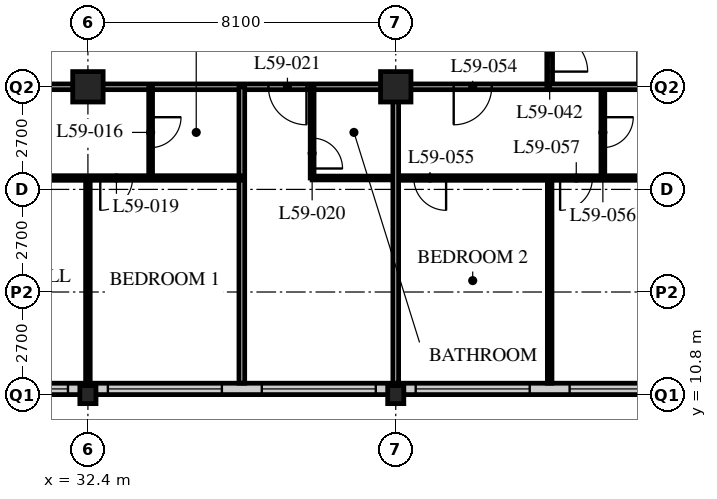
"""IFC4 building model, lengths in metres.
Left out: names, types, materials, properties, quantities, classifications, styles, units other than length and angle.
Written with IfcOpenShell. Run it as: python <this file> out.ifc"""

import sys

from ifc_helpers import new_model, si_unit, direction, frame, frame_2d, origin, origin_2d, place, context, subcontext, project, spatial, rectangle, hollow_rectangle, i_section, extrude, element, fill, save


model = new_model("IFC4")
c1 = context("Model", 3, precision=1e-05, world=origin(), true_north=direction((0.0, 1.0)))
c2 = subcontext(c1, "Body", "Model", "MODEL_VIEW")
j1 = project(units=[si_unit("LENGTHUNIT", "METRE"), si_unit("PLANEANGLEUNIT", "RADIAN")], contexts=[c1])
p1 = place(None, origin())
s1 = spatial("IfcSite", under=j1, at=p1, CompositionType="ELEMENT")
p2 = place(p1, origin())
s2 = spatial("IfcBuilding", under=s1, at=p2, CompositionType="ELEMENT")
p3 = place(p2, frame((0.0, 0.0, 228.0)))
s3 = spatial("IfcBuildingStorey", under=s2, at=p3, CompositionType="ELEMENT", Elevation=228.0)
p4 = place(p3, frame((32.4, 10.8, 0.0), z_axis=(0.0, 0.0, 1.0), x_axis=(1.0, 0.0, 0.0)))
e1 = element("IfcColumn", 1, at=p4, inside=s3, PredefinedType="COLUMN", context=c2, shape_type="SweptSolid", body=[
    extrude(i_section(OverallWidth=0.424, OverallDepth=0.475, WebThickness=0.048, FlangeThickness=0.077, FilletRadius=0.015, at=origin_2d()), origin(), (0.0, 0.0, 1.0), 3.6),
])
p5 = place(p3, frame((32.4, 18.9, 0.0), z_axis=(0.0, 0.0, 1.0), x_axis=(1.0, 0.0, 0.0)))
e2 = element("IfcColumn", 2, at=p5, inside=s3, PredefinedType="COLUMN", context=c2, shape_type="SweptSolid", body=[
    extrude(hollow_rectangle(XDim=0.8, YDim=0.8, WallThickness=0.08, at=origin_2d()), origin(), (0.0, 0.0, 1.0), 3.6),
])
p6 = place(p3, frame((40.5, 10.8, 0.0), z_axis=(0.0, 0.0, 1.0), x_axis=(1.0, 0.0, 0.0)))
e3 = element("IfcColumn", 3, at=p6, inside=s3, PredefinedType="COLUMN", context=c2, shape_type="SweptSolid", body=[
    extrude(i_section(OverallWidth=0.424, OverallDepth=0.475, WebThickness=0.048, FlangeThickness=0.077, FilletRadius=0.015, at=origin_2d()), origin(), (0.0, 0.0, 1.0), 3.6),
])
p7 = place(p3, frame((40.5, 18.9, 0.0), z_axis=(0.0, 0.0, 1.0), x_axis=(1.0, 0.0, 0.0)))
e4 = element("IfcColumn", 4, at=p7, inside=s3, PredefinedType="COLUMN", context=c2, shape_type="SweptSolid", body=[
    extrude(hollow_rectangle(XDim=0.8, YDim=0.8, WallThickness=0.08, at=origin_2d()), origin(), (0.0, 0.0, 1.0), 3.6),
])
p8 = place(p3, frame((8.4, 10.95, 0.0), z_axis=(0.0, 0.0, 1.0), x_axis=(1.0, 0.0, 0.0)))
e5 = element("IfcWall", 5, at=p8, inside=s3, PredefinedType="SOLIDWALL", context=c2, shape_type="SweptSolid", body=[
    extrude(rectangle(XDim=40.2, YDim=0.3, at=frame_2d((20.1, 0.0))), origin(), (0.0, 0.0, 1.0), 3.39),
])
p9 = place(p8, frame((0.225, 0.0, 0.6)))
e6 = element("IfcOpeningElement", 6, at=p9, cuts=e5, PredefinedType="OPENING", context=c2, shape_type="SweptSolid", body=[
    extrude(rectangle(XDim=3.0, YDim=2.0, at=frame_2d((1.5, 1.0))), frame((0.0, 0.16, 0.0), z_axis=(0.0, -1.0, 0.0), x_axis=(1.0, 0.0, 0.0)), (0.0, 0.0, 1.0), 0.32),
])
p10 = place(p8, frame((4.275, 0.0, 0.6)))
e7 = element("IfcOpeningElement", 7, at=p10, cuts=e5, PredefinedType="OPENING", context=c2, shape_type="SweptSolid", body=[
    extrude(rectangle(XDim=3.0, YDim=2.0, at=frame_2d((1.5, 1.0))), frame((0.0, 0.16, 0.0), z_axis=(0.0, -1.0, 0.0), x_axis=(1.0, 0.0, 0.0)), (0.0, 0.0, 1.0), 0.32),
])
p11 = place(p8, frame((8.325, 0.0, 0.6)))
e8 = element("IfcOpeningElement", 8, at=p11, cuts=e5, PredefinedType="OPENING", context=c2, shape_type="SweptSolid", body=[
    extrude(rectangle(XDim=3.0, YDim=2.0, at=frame_2d((1.5, 1.0))), frame((0.0, 0.16, 0.0), z_axis=(0.0, -1.0, 0.0), x_axis=(1.0, 0.0, 0.0)), (0.0, 0.0, 1.0), 0.32),
])
p12 = place(p8, frame((12.375, 0.0, 0.6)))
e9 = element("IfcOpeningElement", 9, at=p12, cuts=e5, PredefinedType="OPENING", context=c2, shape_type="SweptSolid", body=[
    extrude(rectangle(XDim=3.0, YDim=2.0, at=frame_2d((1.5, 1.0))), frame((0.0, 0.16, 0.0), z_axis=(0.0, -1.0, 0.0), x_axis=(1.0, 0.0, 0.0)), (0.0, 0.0, 1.0), 0.32),
])
p13 = place(p8, frame((16.425, 0.0, 0.6)))
e10 = element("IfcOpeningElement", 10, at=p13, cuts=e5, PredefinedType="OPENING", context=c2, shape_type="SweptSolid", body=[
    extrude(rectangle(XDim=3.0, YDim=2.0, at=frame_2d((1.5, 1.0))), frame((0.0, 0.16, 0.0), z_axis=(0.0, -1.0, 0.0), x_axis=(1.0, 0.0, 0.0)), (0.0, 0.0, 1.0), 0.32),
])
p14 = place(p8, frame((20.475, 0.0, 0.6)))
e11 = element("IfcOpeningElement", 11, at=p14, cuts=e5, PredefinedType="OPENING", context=c2, shape_type="SweptSolid", body=[
    extrude(rectangle(XDim=3.0, YDim=2.0, at=frame_2d((1.5, 1.0))), frame((0.0, 0.16, 0.0), z_axis=(0.0, -1.0, 0.0), x_axis=(1.0, 0.0, 0.0)), (0.0, 0.0, 1.0), 0.32),
])
p15 = place(p8, frame((24.525, 0.0, 0.6)))
e12 = element("IfcOpeningElement", 12, at=p15, cuts=e5, PredefinedType="OPENING", context=c2, shape_type="SweptSolid", body=[
    extrude(rectangle(XDim=3.0, YDim=2.0, at=frame_2d((1.5, 1.0))), frame((0.0, 0.16, 0.0), z_axis=(0.0, -1.0, 0.0), x_axis=(1.0, 0.0, 0.0)), (0.0, 0.0, 1.0), 0.32),
])
p16 = place(p8, frame((28.575, 0.0, 0.6)))
e13 = element("IfcOpeningElement", 13, at=p16, cuts=e5, PredefinedType="OPENING", context=c2, shape_type="SweptSolid", body=[
    extrude(rectangle(XDim=3.0, YDim=2.0, at=frame_2d((1.5, 1.0))), frame((0.0, 0.16, 0.0), z_axis=(0.0, -1.0, 0.0), x_axis=(1.0, 0.0, 0.0)), (0.0, 0.0, 1.0), 0.32),
])
p17 = place(p8, frame((32.625, 0.0, 0.6)))
e14 = element("IfcOpeningElement", 14, at=p17, cuts=e5, PredefinedType="OPENING", context=c2, shape_type="SweptSolid", body=[
    extrude(rectangle(XDim=3.0, YDim=2.0, at=frame_2d((1.5, 1.0))), frame((0.0, 0.16, 0.0), z_axis=(0.0, -1.0, 0.0), x_axis=(1.0, 0.0, 0.0)), (0.0, 0.0, 1.0), 0.32),
])
p18 = place(p8, frame((36.675, 0.0, 0.6)))
e15 = element("IfcOpeningElement", 15, at=p18, cuts=e5, PredefinedType="OPENING", context=c2, shape_type="SweptSolid", body=[
    extrude(rectangle(XDim=3.0, YDim=2.0, at=frame_2d((1.5, 1.0))), frame((0.0, 0.16, 0.0), z_axis=(0.0, -1.0, 0.0), x_axis=(1.0, 0.0, 0.0)), (0.0, 0.0, 1.0), 0.32),
])
p19 = place(p3, frame((8.1, 18.9, 0.0), z_axis=(0.0, 0.0, 1.0), x_axis=(1.0, 0.0, 0.0)))
e16 = element("IfcWall", 16, at=p19, inside=s3, PredefinedType="PARTITIONING", context=c2, shape_type="SweptSolid", body=[
    extrude(rectangle(XDim=36.45, YDim=0.15, at=frame_2d((18.225, 0.0))), origin(), (0.0, 0.0, 1.0), 2.628),
])
p20 = place(p19, frame((4.45, 0.0, 0.0)))
e17 = element("IfcOpeningElement", 17, at=p20, cuts=e16, PredefinedType="OPENING", context=c2, shape_type="SweptSolid", body=[
    extrude(rectangle(XDim=1.0, YDim=2.1, at=frame_2d((0.5, 1.05))), frame((0.0, 0.085, 0.0), z_axis=(0.0, -1.0, 0.0), x_axis=(1.0, 0.0, 0.0)), (0.0, 0.0, 1.0), 0.17),
])
p21 = place(p19, frame((17.1, 0.0, 0.0)))
e18 = element("IfcOpeningElement", 18, at=p21, cuts=e16, PredefinedType="OPENING", context=c2, shape_type="SweptSolid", body=[
    extrude(rectangle(XDim=1.0, YDim=2.1, at=frame_2d((0.5, 1.05))), frame((0.0, 0.085, 0.0), z_axis=(0.0, -1.0, 0.0), x_axis=(1.0, 0.0, 0.0)), (0.0, 0.0, 1.0), 0.17),
])
p22 = place(p19, frame((29.05, 0.0, 0.0)))
e19 = element("IfcOpeningElement", 19, at=p22, cuts=e16, PredefinedType="OPENING", context=c2, shape_type="SweptSolid", body=[
    extrude(rectangle(XDim=1.0, YDim=2.1, at=frame_2d((0.5, 1.05))), frame((0.0, 0.085, 0.0), z_axis=(0.0, -1.0, 0.0), x_axis=(1.0, 0.0, 0.0)), (0.0, 0.0, 1.0), 0.17),
])
p23 = place(p19, frame((2.625, 0.0, 0.0)))
e20 = element("IfcOpeningElement", 20, at=p23, cuts=e16, PredefinedType="OPENING", context=c2, shape_type="SweptSolid", body=[
    extrude(rectangle(XDim=1.0, YDim=2.1, at=frame_2d((0.5, 1.05))), frame((0.0, 0.085, 0.0), z_axis=(0.0, -1.0, 0.0), x_axis=(1.0, 0.0, 0.0)), (0.0, 0.0, 1.0), 0.17),
])
p24 = place(p19, frame((33.925, 0.0, 0.0)))
e21 = element("IfcOpeningElement", 21, at=p24, cuts=e16, PredefinedType="OPENING", context=c2, shape_type="SweptSolid", body=[
    extrude(rectangle(XDim=1.0, YDim=2.1, at=frame_2d((0.5, 1.05))), frame((0.0, 0.085, 0.0), z_axis=(0.0, -1.0, 0.0), x_axis=(1.0, 0.0, 0.0)), (0.0, 0.0, 1.0), 0.17),
])
p25 = place(p3, frame((44.55, 18.9, 0.0), z_axis=(0.0, 0.0, 1.0), x_axis=(0.0, 1.0, 0.0)))
e22 = element("IfcWall", 22, at=p25, inside=s3, PredefinedType="PARTITIONING", context=c2, shape_type="SweptSolid", body=[
    extrude(rectangle(XDim=24.3, YDim=0.15, at=frame_2d((12.15, 0.0))), origin(), (0.0, 0.0, 1.0), 3.39),
])
p26 = place(p25, frame((0.4, 0.0, 0.0)))
e23 = element("IfcOpeningElement", 23, at=p26, cuts=e22, PredefinedType="OPENING", context=c2, shape_type="SweptSolid", body=[
    extrude(rectangle(XDim=1.0, YDim=2.1, at=frame_2d((0.5, 1.05))), frame((0.0, 0.085, 0.0), z_axis=(0.0, -1.0, 0.0), x_axis=(1.0, 0.0, 0.0)), (0.0, 0.0, 1.0), 0.17),
])
p27 = place(p25, frame((16.6, 0.0, 0.0)))
e24 = element("IfcOpeningElement", 24, at=p27, cuts=e22, PredefinedType="OPENING", context=c2, shape_type="SweptSolid", body=[
    extrude(rectangle(XDim=1.0, YDim=2.1, at=frame_2d((0.5, 1.05))), frame((0.0, 0.085, 0.0), z_axis=(0.0, -1.0, 0.0), x_axis=(1.0, 0.0, 0.0)), (0.0, 0.0, 1.0), 0.17),
])
p28 = place(p3, frame((34.05, 18.9, 0.0), z_axis=(0.0, 0.0, 1.0), x_axis=(0.0, -1.0, 0.0)))
e25 = element("IfcWall", 25, at=p28, inside=s3, PredefinedType="PARTITIONING", context=c2, shape_type="SweptSolid", body=[
    extrude(rectangle(XDim=2.4, YDim=0.1, at=frame_2d((1.2, 0.0))), origin(), (0.0, 0.0, 1.0), 3.39),
])
p29 = place(p28, frame((0.8, 0.0, 0.0)))
e26 = element("IfcOpeningElement", 26, at=p29, cuts=e25, PredefinedType="OPENING", context=c2, shape_type="SweptSolid", body=[
    extrude(rectangle(XDim=0.8, YDim=2.1, at=frame_2d((0.4, 1.05))), frame((0.0, 0.06, 0.0), z_axis=(0.0, -1.0, 0.0), x_axis=(1.0, 0.0, 0.0)), (0.0, 0.0, 1.0), 0.12),
])
p30 = place(p3, frame((32.4, 16.5, 0.0), z_axis=(0.0, 0.0, 1.0), x_axis=(0.0, -1.0, 0.0)))
e27 = element("IfcWall", 27, at=p30, inside=s3, PredefinedType="PARTITIONING", context=c2, shape_type="SweptSolid", body=[
    extrude(rectangle(XDim=5.4, YDim=0.12, at=frame_2d((2.7, 0.0))), origin(), (0.0, 0.0, 1.0), 2.628),
])
p31 = place(p3, frame((36.45, 18.9, 0.0), z_axis=(0.0, 0.0, 1.0), x_axis=(0.0, -1.0, 0.0)))
e28 = element("IfcWall", 28, at=p31, inside=s3, PredefinedType="PARTITIONING", context=c2, shape_type="SweptSolid", body=[
    extrude(rectangle(XDim=7.8, YDim=0.15, at=frame_2d((3.9, 0.0))), origin(), (0.0, 0.0, 1.0), 3.39),
])
p32 = place(p3, frame((38.3, 16.5, 0.0), z_axis=(0.0, 0.0, 1.0), x_axis=(1.0, 0.0, 0.0)))
e29 = element("IfcWall", 29, at=p32, inside=s3, PredefinedType="PARTITIONING", context=c2, shape_type="SweptSolid", body=[
    extrude(rectangle(XDim=2.2, YDim=0.1, at=frame_2d((1.1, 0.0))), origin(), (0.0, 0.0, 1.0), 3.39),
])
p33 = place(p3, frame((38.3, 18.9, 0.0), z_axis=(0.0, 0.0, 1.0), x_axis=(0.0, -1.0, 0.0)))
e30 = element("IfcWall", 30, at=p33, inside=s3, PredefinedType="PARTITIONING", context=c2, shape_type="SweptSolid", body=[
    extrude(rectangle(XDim=2.4, YDim=0.1, at=frame_2d((1.2, 0.0))), origin(), (0.0, 0.0, 1.0), 3.39),
])
p34 = place(p33, frame((1.35, 0.0, 0.0)))
e31 = element("IfcOpeningElement", 31, at=p34, cuts=e30, PredefinedType="OPENING", context=c2, shape_type="SweptSolid", body=[
    extrude(rectangle(XDim=0.8, YDim=2.1, at=frame_2d((0.4, 1.05))), frame((0.0, 0.06, 0.0), z_axis=(0.0, -1.0, 0.0), x_axis=(1.0, 0.0, 0.0)), (0.0, 0.0, 1.0), 0.12),
])
p35 = place(p3, frame((8.1, 16.5, 0.0), z_axis=(0.0, 0.0, 1.0), x_axis=(1.0, 0.0, 0.0)))
e32 = element("IfcWall", 32, at=p35, inside=s3, PredefinedType="PARTITIONING", context=c2, shape_type="SweptSolid", body=[
    extrude(rectangle(XDim=28.35, YDim=0.12, at=frame_2d((14.175, 0.0))), origin(), (0.0, 0.0, 1.0), 3.39),
])
p36 = place(p35, frame((5.025, 0.0, 0.0)))
e33 = element("IfcOpeningElement", 33, at=p36, cuts=e32, PredefinedType="OPENING", context=c2, shape_type="SweptSolid", body=[
    extrude(rectangle(XDim=0.85, YDim=2.1, at=frame_2d((0.425, 1.05))), frame((0.0, 0.07, 0.0), z_axis=(0.0, -1.0, 0.0), x_axis=(1.0, 0.0, 0.0)), (0.0, 0.0, 1.0), 0.14),
])
p37 = place(p35, frame((12.475, 0.0, 0.0)))
e34 = element("IfcOpeningElement", 34, at=p37, cuts=e32, PredefinedType="OPENING", context=c2, shape_type="SweptSolid", body=[
    extrude(rectangle(XDim=0.85, YDim=2.1, at=frame_2d((0.425, 1.05))), frame((0.0, 0.07, 0.0), z_axis=(0.0, -1.0, 0.0), x_axis=(1.0, 0.0, 0.0)), (0.0, 0.0, 1.0), 0.14),
])
p38 = place(p35, frame((17.175, 0.0, 0.0)))
e35 = element("IfcOpeningElement", 35, at=p38, cuts=e32, PredefinedType="OPENING", context=c2, shape_type="SweptSolid", body=[
    extrude(rectangle(XDim=0.85, YDim=2.1, at=frame_2d((0.425, 1.05))), frame((0.0, 0.07, 0.0), z_axis=(0.0, -1.0, 0.0), x_axis=(1.0, 0.0, 0.0)), (0.0, 0.0, 1.0), 0.14),
])
p39 = place(p35, frame((24.625, 0.0, 0.0)))
e36 = element("IfcOpeningElement", 36, at=p39, cuts=e32, PredefinedType="OPENING", context=c2, shape_type="SweptSolid", body=[
    extrude(rectangle(XDim=0.85, YDim=2.1, at=frame_2d((0.425, 1.05))), frame((0.0, 0.07, 0.0), z_axis=(0.0, -1.0, 0.0), x_axis=(1.0, 0.0, 0.0)), (0.0, 0.0, 1.0), 0.14),
])
p40 = place(p35, frame((2.725, 0.0, 0.0)))
e37 = element("IfcOpeningElement", 37, at=p40, cuts=e32, PredefinedType="OPENING", context=c2, shape_type="SweptSolid", body=[
    extrude(rectangle(XDim=0.85, YDim=2.1, at=frame_2d((0.425, 1.05))), frame((0.0, 0.07, 0.0), z_axis=(0.0, -1.0, 0.0), x_axis=(1.0, 0.0, 0.0)), (0.0, 0.0, 1.0), 0.14),
])
p41 = place(p3, frame((40.5, 16.5, 0.0), z_axis=(0.0, 0.0, 1.0), x_axis=(1.0, 0.0, 0.0)))
e38 = element("IfcWall", 38, at=p41, inside=s3, PredefinedType="PARTITIONING", context=c2, shape_type="SweptSolid", body=[
    extrude(rectangle(XDim=8.05, YDim=0.12, at=frame_2d((4.025, 0.0))), origin(), (0.0, 0.0, 1.0), 3.39),
])
p42 = place(p41, frame((0.475, 0.0, 0.0)))
e39 = element("IfcOpeningElement", 39, at=p42, cuts=e38, PredefinedType="OPENING", context=c2, shape_type="SweptSolid", body=[
    extrude(rectangle(XDim=0.85, YDim=2.1, at=frame_2d((0.425, 1.05))), frame((0.0, 0.07, 0.0), z_axis=(0.0, -1.0, 0.0), x_axis=(1.0, 0.0, 0.0)), (0.0, 0.0, 1.0), 0.14),
])
p43 = place(p41, frame((4.325, 0.0, 0.0)))
e40 = element("IfcOpeningElement", 40, at=p43, cuts=e38, PredefinedType="OPENING", context=c2, shape_type="SweptSolid", body=[
    extrude(rectangle(XDim=0.85, YDim=2.1, at=frame_2d((0.425, 1.05))), frame((0.0, 0.07, 0.0), z_axis=(0.0, -1.0, 0.0), x_axis=(1.0, 0.0, 0.0)), (0.0, 0.0, 1.0), 0.14),
])
p44 = place(p3, frame((45.95, 18.9, 0.0), z_axis=(0.0, 0.0, 1.0), x_axis=(0.0, -1.0, 0.0)))
e41 = element("IfcWall", 41, at=p44, inside=s3, PredefinedType="PARTITIONING", context=c2, shape_type="SweptSolid", body=[
    extrude(rectangle(XDim=2.4, YDim=0.1, at=frame_2d((1.2, 0.0))), origin(), (0.0, 0.0, 1.0), 3.39),
])
p45 = place(p44, frame((0.8, 0.0, 0.0)))
e42 = element("IfcOpeningElement", 42, at=p45, cuts=e41, PredefinedType="OPENING", context=c2, shape_type="SweptSolid", body=[
    extrude(rectangle(XDim=0.8, YDim=2.1, at=frame_2d((0.4, 1.05))), frame((0.0, 0.06, 0.0), z_axis=(0.0, -1.0, 0.0), x_axis=(1.0, 0.0, 0.0)), (0.0, 0.0, 1.0), 0.12),
])
p46 = place(p3, frame((44.55, 16.5, 0.0), z_axis=(0.0, 0.0, 1.0), x_axis=(0.0, -1.0, 0.0)))
e43 = element("IfcWall", 43, at=p46, inside=s3, PredefinedType="PARTITIONING", context=c2, shape_type="SweptSolid", body=[
    extrude(rectangle(XDim=5.4, YDim=0.12, at=frame_2d((2.7, 0.0))), origin(), (0.0, 0.0, 1.0), 3.39),
])
p47 = place(p3, frame((44.55, 18.9, 0.0), z_axis=(0.0, 0.0, 1.0), x_axis=(1.0, 0.0, 0.0)))
e44 = element("IfcWall", 44, at=p47, inside=s3, PredefinedType="PARTITIONING", context=c2, shape_type="SweptSolid", body=[
    extrude(rectangle(XDim=7.8, YDim=0.15, at=frame_2d((3.9, 0.0))), origin(), (0.0, 0.0, 1.0), 2.628),
])
p48 = place(p3, frame((40.5, 18.9, 0.0), z_axis=(0.0, 0.0, 1.0), x_axis=(0.0, -1.0, 0.0)))
e45 = element("IfcWall", 45, at=p48, inside=s3, PredefinedType="PARTITIONING", context=c2, shape_type="SweptSolid", body=[
    extrude(rectangle(XDim=7.8, YDim=0.15, at=frame_2d((3.9, 0.0))), origin(), (0.0, 0.0, 1.0), 2.628),
])
p49 = place(p14, origin())
e46 = element("IfcWindow", 46, at=p49, inside=s3, PartitioningType="SINGLE_PANEL", PredefinedType="WINDOW", context=c2, shape_type="SweptSolid", body=[
    extrude(rectangle(XDim=3.0, YDim=2.0, at=frame_2d((1.5, 1.0))), frame((0.0, 0.03, 0.0), z_axis=(0.0, -1.0, 0.0), x_axis=(1.0, 0.0, 0.0)), (0.0, 0.0, 1.0), 0.06),
])
fill(e11, e46)
p50 = place(p15, origin())
e47 = element("IfcWindow", 47, at=p50, inside=s3, PartitioningType="SINGLE_PANEL", PredefinedType="WINDOW", context=c2, shape_type="SweptSolid", body=[
    extrude(rectangle(XDim=3.0, YDim=2.0, at=frame_2d((1.5, 1.0))), frame((0.0, 0.03, 0.0), z_axis=(0.0, -1.0, 0.0), x_axis=(1.0, 0.0, 0.0)), (0.0, 0.0, 1.0), 0.06),
])
fill(e12, e47)
p51 = place(p16, origin())
e48 = element("IfcWindow", 48, at=p51, inside=s3, PartitioningType="SINGLE_PANEL", PredefinedType="WINDOW", context=c2, shape_type="SweptSolid", body=[
    extrude(rectangle(XDim=3.0, YDim=2.0, at=frame_2d((1.5, 1.0))), frame((0.0, 0.03, 0.0), z_axis=(0.0, -1.0, 0.0), x_axis=(1.0, 0.0, 0.0)), (0.0, 0.0, 1.0), 0.06),
])
fill(e13, e48)
p52 = place(p17, origin())
e49 = element("IfcWindow", 49, at=p52, inside=s3, PartitioningType="SINGLE_PANEL", PredefinedType="WINDOW", context=c2, shape_type="SweptSolid", body=[
    extrude(rectangle(XDim=3.0, YDim=2.0, at=frame_2d((1.5, 1.0))), frame((0.0, 0.03, 0.0), z_axis=(0.0, -1.0, 0.0), x_axis=(1.0, 0.0, 0.0)), (0.0, 0.0, 1.0), 0.06),
])
fill(e14, e49)
p53 = place(p18, origin())
e50 = element("IfcWindow", 50, at=p53, inside=s3, PartitioningType="SINGLE_PANEL", PredefinedType="WINDOW", context=c2, shape_type="SweptSolid", body=[
    extrude(rectangle(XDim=3.0, YDim=2.0, at=frame_2d((1.5, 1.0))), frame((0.0, 0.03, 0.0), z_axis=(0.0, -1.0, 0.0), x_axis=(1.0, 0.0, 0.0)), (0.0, 0.0, 1.0), 0.06),
])
fill(e15, e50)
p54 = place(p29, origin())
e51 = element("IfcDoor", 51, at=p54, inside=s3, OperationType="SINGLE_SWING_LEFT", PredefinedType="DOOR", context=c2, shape_type="SweptSolid", body=[
    extrude(rectangle(XDim=0.8, YDim=2.1, at=frame_2d((0.4, 1.05))), frame((0.0, 0.025, 0.0), z_axis=(0.0, -1.0, 0.0), x_axis=(1.0, 0.0, 0.0)), (0.0, 0.0, 1.0), 0.05),
])
fill(e26, e51)
p55 = place(p39, origin())
e52 = element("IfcDoor", 52, at=p55, inside=s3, OperationType="SINGLE_SWING_RIGHT", PredefinedType="DOOR", context=c2, shape_type="SweptSolid", body=[
    extrude(rectangle(XDim=0.85, YDim=2.1, at=frame_2d((0.425, 1.05))), frame((0.0, 0.025, 0.0), z_axis=(0.0, -1.0, 0.0), x_axis=(1.0, 0.0, 0.0)), (0.0, 0.0, 1.0), 0.05),
])
fill(e36, e52)
p56 = place(p34, origin())
e53 = element("IfcDoor", 53, at=p56, inside=s3, OperationType="SINGLE_SWING_RIGHT", PredefinedType="DOOR", context=c2, shape_type="SweptSolid", body=[
    extrude(rectangle(XDim=0.8, YDim=2.1, at=frame_2d((0.4, 1.05))), frame((0.0, 0.025, 0.0), z_axis=(0.0, -1.0, 0.0), x_axis=(1.0, 0.0, 0.0)), (0.0, 0.0, 1.0), 0.05),
])
fill(e31, e53)
p57 = place(p22, origin())
e54 = element("IfcDoor", 54, at=p57, inside=s3, OperationType="SINGLE_SWING_LEFT", PredefinedType="DOOR", context=c2, shape_type="SweptSolid", body=[
    extrude(rectangle(XDim=1.0, YDim=2.1, at=frame_2d((0.5, 1.05))), frame((0.0, 0.025, 0.0), z_axis=(0.0, -1.0, 0.0), x_axis=(1.0, 0.0, 0.0)), (0.0, 0.0, 1.0), 0.05),
])
fill(e19, e54)
p58 = place(p26, origin())
e55 = element("IfcDoor", 55, at=p58, inside=s3, OperationType="SINGLE_SWING_RIGHT", PredefinedType="DOOR", context=c2, shape_type="SweptSolid", body=[
    extrude(rectangle(XDim=1.0, YDim=2.1, at=frame_2d((0.5, 1.05))), frame((0.0, 0.025, 0.0), z_axis=(0.0, -1.0, 0.0), x_axis=(1.0, 0.0, 0.0)), (0.0, 0.0, 1.0), 0.05),
])
fill(e23, e55)
p59 = place(p24, origin())
e56 = element("IfcDoor", 56, at=p59, inside=s3, OperationType="SINGLE_SWING_RIGHT", PredefinedType="DOOR", context=c2, shape_type="SweptSolid", body=[
    extrude(rectangle(XDim=1.0, YDim=2.1, at=frame_2d((0.5, 1.05))), frame((0.0, 0.025, 0.0), z_axis=(0.0, -1.0, 0.0), x_axis=(1.0, 0.0, 0.0)), (0.0, 0.0, 1.0), 0.05),
])
fill(e21, e56)
p60 = place(p42, origin())
e57 = element("IfcDoor", 57, at=p60, inside=s3, OperationType="SINGLE_SWING_LEFT", PredefinedType="DOOR", context=c2, shape_type="SweptSolid", body=[
    extrude(rectangle(XDim=0.85, YDim=2.1, at=frame_2d((0.425, 1.05))), frame((0.0, 0.025, 0.0), z_axis=(0.0, -1.0, 0.0), x_axis=(1.0, 0.0, 0.0)), (0.0, 0.0, 1.0), 0.05),
])
fill(e39, e57)
p61 = place(p45, origin())
e58 = element("IfcDoor", 58, at=p61, inside=s3, OperationType="SINGLE_SWING_LEFT", PredefinedType="DOOR", context=c2, shape_type="SweptSolid", body=[
    extrude(rectangle(XDim=0.8, YDim=2.1, at=frame_2d((0.4, 1.05))), frame((0.0, 0.025, 0.0), z_axis=(0.0, -1.0, 0.0), x_axis=(1.0, 0.0, 0.0)), (0.0, 0.0, 1.0), 0.05),
])
fill(e42, e58)
p62 = place(p43, origin())
e59 = element("IfcDoor", 59, at=p62, inside=s3, OperationType="SINGLE_SWING_RIGHT", PredefinedType="DOOR", context=c2, shape_type="SweptSolid", body=[
    extrude(rectangle(XDim=0.85, YDim=2.1, at=frame_2d((0.425, 1.05))), frame((0.0, 0.025, 0.0), z_axis=(0.0, -1.0, 0.0), x_axis=(1.0, 0.0, 0.0)), (0.0, 0.0, 1.0), 0.05),
])
fill(e40, e59)
save(model, sys.argv[1])
